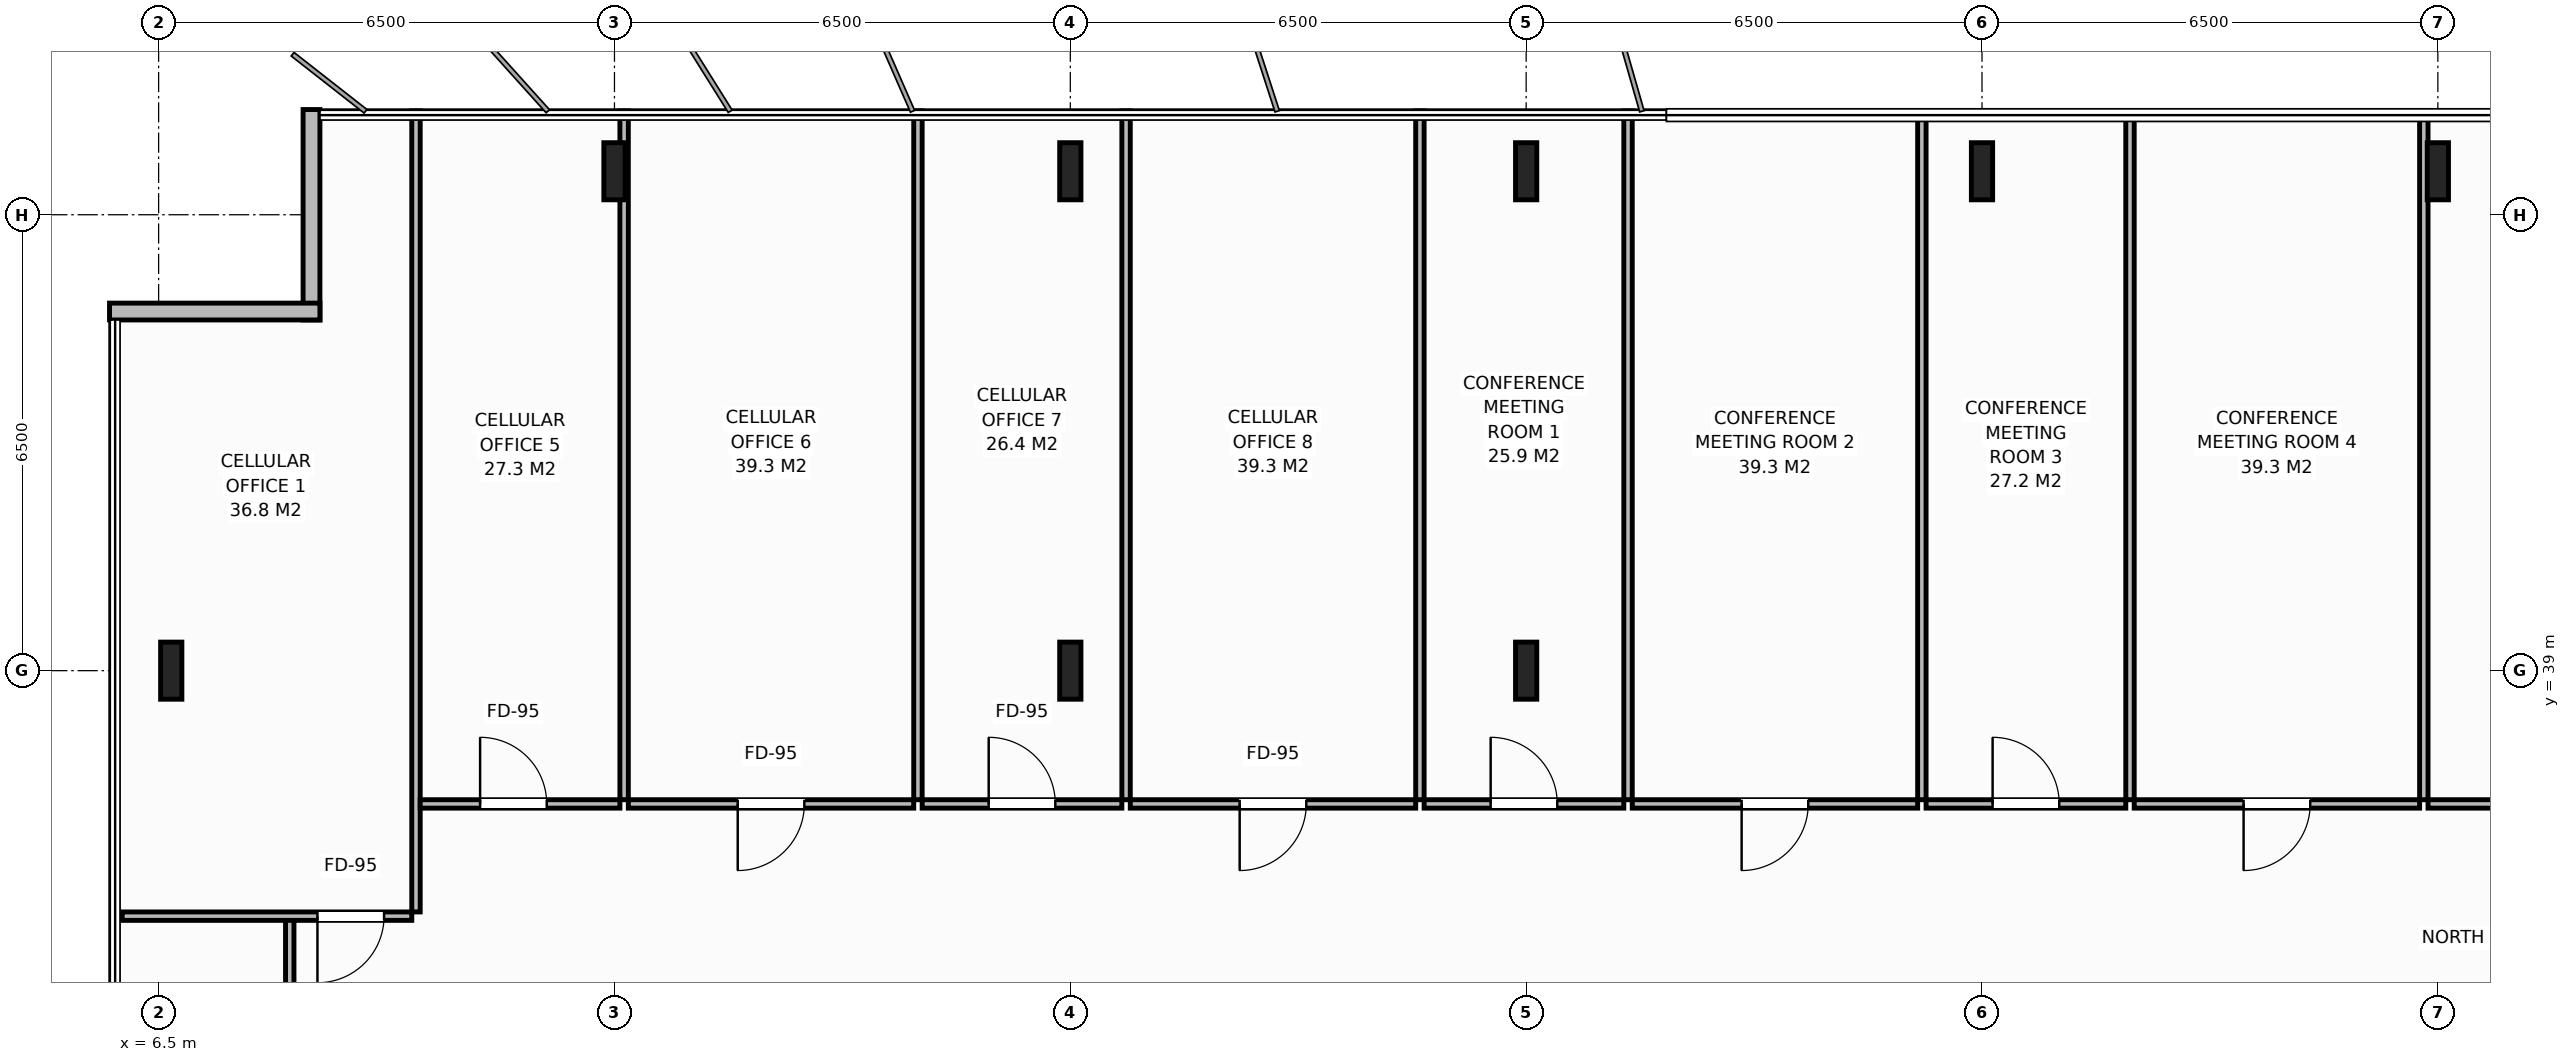
"""IFC4 building model, lengths in metres.
Left out: names, types, materials, properties, quantities, classifications, styles, units other than length and angle.
Written with IfcOpenShell. Run it as: python <this file> out.ifc"""

import sys

from ifc_helpers import new_model, si_unit, direction, frame, frame_2d, origin, origin_2d, place, context, subcontext, project, spatial, rectangle, i_section, extrude, element, fill, save


model = new_model("IFC4")
c1 = context("Model", 3, precision=1e-05, world=origin(), true_north=direction((0.0, 1.0)))
c2 = subcontext(c1, "Body", "Model", "MODEL_VIEW")
j1 = project(units=[si_unit("LENGTHUNIT", "METRE"), si_unit("PLANEANGLEUNIT", "RADIAN")], contexts=[c1])
p1 = place(None, origin())
s1 = spatial("IfcSite", under=j1, at=p1, CompositionType="ELEMENT")
p2 = place(p1, origin())
s2 = spatial("IfcBuilding", under=s1, at=p2, CompositionType="ELEMENT")
p3 = place(p2, frame((0.0, 0.0, 251.8)))
s3 = spatial("IfcBuildingStorey", under=s2, at=p3, CompositionType="ELEMENT", Elevation=251.8)
for number, where, z_axis, x_axis in (
    (1, (19.5, 39.0, 0.0), (0.0, 0.0, 1.0), (1.0, 0.0, 0.0)),
    (2, (26.0, 39.0, 0.0), (0.0, 0.0, 1.0), (1.0, 0.0, 0.0)),
    (3, (13.0, 46.12, 0.0), (0.0, 0.0, 1.0), (1.0, 0.0, 0.0)),
    (4, (19.5, 46.12, 0.0), (0.0, 0.0, 1.0), (1.0, 0.0, 0.0)),
    (5, (26.0, 46.12, 0.0), (0.0, 0.0, 1.0), (1.0, 0.0, 0.0)),
    (6, (32.5, 46.12, 0.0), (0.0, 0.0, 1.0), (1.0, 0.0, 0.0)),
    (7, (39.0, 46.12, 0.0), (0.0, 0.0, 1.0), (1.0, 0.0, 0.0)),
    (8, (6.68, 39.0, 0.0), (0.0, 0.0, 1.0), (1.0, 0.0, 0.0)),
):
    element("IfcColumn", number, at=place(p3, frame(where, z_axis=z_axis, x_axis=x_axis)), inside=s3, PredefinedType="COLUMN", context=c2, shape_type="SweptSolid", body=[
        extrude(i_section(OverallWidth=0.303, OverallDepth=0.814, WebThickness=0.021, FlangeThickness=0.04, at=origin_2d()), origin(), (0.0, 0.0, 1.0), 3.8),
    ])
for number, where, z_axis, x_axis in (
    (9, (8.68, 44.0, 0.0), (0.0, 0.0, 1.0), (0.0, 1.0, 0.0)),
    (10, (5.8, 44.12, 0.0), (0.0, 0.0, 1.0), (1.0, 0.0, 0.0)),
):
    element("IfcWall", number, at=place(p3, frame(where, z_axis=z_axis, x_axis=x_axis)), inside=s3, PredefinedType="STANDARD", context=c2, shape_type="SweptSolid", body=[
        extrude(rectangle(XDim=3.0, YDim=0.24, at=frame_2d((1.5, 0.0))), origin(), (0.0, 0.0, 1.0), 3.588),
    ])
p4 = place(p3, frame((8.37, 33.4, 0.0), z_axis=(0.0, 0.0, 1.0), x_axis=(0.0, 1.0, 0.0)))
e11 = element("IfcWall", 11, at=p4, inside=s3, PredefinedType="PARTITIONING", context=c2, shape_type="SweptSolid", body=[
    extrude(rectangle(XDim=2.1, YDim=0.12, at=frame_2d((1.05, 0.0))), origin(), (0.0, 0.0, 1.0), 3.588),
])
p5 = place(p3, frame((10.17, 35.56, 0.0), z_axis=(0.0, 0.0, 1.0), x_axis=(0.0, 1.0, 0.0)))
e12 = element("IfcWall", 12, at=p5, inside=s3, PredefinedType="PARTITIONING", context=c2, shape_type="SweptSolid", body=[
    extrude(rectangle(XDim=11.42, YDim=0.12, at=frame_2d((5.71, 0.0))), origin(), (0.0, 0.0, 1.0), 3.588),
])
p6 = place(p3, frame((5.98, 35.5, 0.0), z_axis=(0.0, 0.0, 1.0), x_axis=(1.0, 0.0, 0.0)))
e13 = element("IfcWall", 13, at=p6, inside=s3, PredefinedType="PARTITIONING", context=c2, shape_type="SweptSolid", body=[
    extrude(rectangle(XDim=4.13, YDim=0.12, at=frame_2d((2.065, 0.0))), origin(), (0.0, 0.0, 1.0), 3.588),
])
p7 = place(p6, frame((2.785, 0.0, 0.0)))
e14 = element("IfcOpeningElement", 14, at=p7, cuts=e13, PredefinedType="OPENING", context=c2, shape_type="SweptSolid", body=[
    extrude(rectangle(XDim=0.95, YDim=2.15, at=frame_2d((0.475, 1.075))), frame((0.0, 0.07, 0.0), z_axis=(0.0, -1.0, 0.0), x_axis=(1.0, 0.0, 0.0)), (0.0, 0.0, 1.0), 0.14),
])
p8 = place(p3, frame((13.138, 37.16, 0.0), z_axis=(0.0, 0.0, 1.0), x_axis=(0.0, 1.0, 0.0)))
e15 = element("IfcWall", 15, at=p8, inside=s3, PredefinedType="PARTITIONING", context=c2, shape_type="SweptSolid", body=[
    extrude(rectangle(XDim=9.82, YDim=0.12, at=frame_2d((4.91, 0.0))), origin(), (0.0, 0.0, 1.0), 2.388),
])
p9 = place(p3, frame((10.23, 37.1, 0.0), z_axis=(0.0, 0.0, 1.0), x_axis=(1.0, 0.0, 0.0)))
e16 = element("IfcWall", 16, at=p9, inside=s3, PredefinedType="PARTITIONING", context=c2, shape_type="SweptSolid", body=[
    extrude(rectangle(XDim=2.848, YDim=0.12, at=frame_2d((1.424, 0.0))), origin(), (0.0, 0.0, 1.0), 3.588),
])
p10 = place(p9, frame((0.854, 0.0, 0.0)))
e17 = element("IfcOpeningElement", 17, at=p10, cuts=e16, PredefinedType="OPENING", context=c2, shape_type="SweptSolid", body=[
    extrude(rectangle(XDim=0.95, YDim=2.15, at=frame_2d((0.475, 1.075))), frame((0.0, 0.07, 0.0), z_axis=(0.0, -1.0, 0.0), x_axis=(1.0, 0.0, 0.0)), (0.0, 0.0, 1.0), 0.14),
])
p11 = place(p3, frame((17.327, 37.16, 0.0), z_axis=(0.0, 0.0, 1.0), x_axis=(0.0, 1.0, 0.0)))
e18 = element("IfcWall", 18, at=p11, inside=s3, PredefinedType="PARTITIONING", context=c2, shape_type="SweptSolid", body=[
    extrude(rectangle(XDim=9.82, YDim=0.12, at=frame_2d((4.91, 0.0))), origin(), (0.0, 0.0, 1.0), 3.588),
])
p12 = place(p3, frame((13.198, 37.1, 0.0), z_axis=(0.0, 0.0, 1.0), x_axis=(1.0, 0.0, 0.0)))
e19 = element("IfcWall", 19, at=p12, inside=s3, PredefinedType="PARTITIONING", context=c2, shape_type="SweptSolid", body=[
    extrude(rectangle(XDim=4.07, YDim=0.12, at=frame_2d((2.035, 0.0))), origin(), (0.0, 0.0, 1.0), 3.588),
])
p13 = place(p12, frame((1.56, 0.0, 0.0)))
e20 = element("IfcOpeningElement", 20, at=p13, cuts=e19, PredefinedType="OPENING", context=c2, shape_type="SweptSolid", body=[
    extrude(rectangle(XDim=0.95, YDim=2.15, at=frame_2d((0.475, 1.075))), frame((0.0, 0.07, 0.0), z_axis=(0.0, -1.0, 0.0), x_axis=(1.0, 0.0, 0.0)), (0.0, 0.0, 1.0), 0.14),
])
p14 = place(p3, frame((20.295, 37.16, 0.0), z_axis=(0.0, 0.0, 1.0), x_axis=(0.0, 1.0, 0.0)))
e21 = element("IfcWall", 21, at=p14, inside=s3, PredefinedType="PARTITIONING", context=c2, shape_type="SweptSolid", body=[
    extrude(rectangle(XDim=9.82, YDim=0.12, at=frame_2d((4.91, 0.0))), origin(), (0.0, 0.0, 1.0), 3.588),
])
p15 = place(p3, frame((17.387, 37.1, 0.0), z_axis=(0.0, 0.0, 1.0), x_axis=(1.0, 0.0, 0.0)))
e22 = element("IfcWall", 22, at=p15, inside=s3, PredefinedType="PARTITIONING", context=c2, shape_type="SweptSolid", body=[
    extrude(rectangle(XDim=2.848, YDim=0.12, at=frame_2d((1.424, 0.0))), origin(), (0.0, 0.0, 1.0), 3.588),
])
p16 = place(p15, frame((0.949, 0.0, 0.0)))
e23 = element("IfcOpeningElement", 23, at=p16, cuts=e22, PredefinedType="OPENING", context=c2, shape_type="SweptSolid", body=[
    extrude(rectangle(XDim=0.95, YDim=2.15, at=frame_2d((0.475, 1.075))), frame((0.0, 0.07, 0.0), z_axis=(0.0, -1.0, 0.0), x_axis=(1.0, 0.0, 0.0)), (0.0, 0.0, 1.0), 0.14),
])
p17 = place(p3, frame((24.485, 37.16, 0.0), z_axis=(0.0, 0.0, 1.0), x_axis=(0.0, 1.0, 0.0)))
e24 = element("IfcWall", 24, at=p17, inside=s3, PredefinedType="PARTITIONING", context=c2, shape_type="SweptSolid", body=[
    extrude(rectangle(XDim=9.82, YDim=0.12, at=frame_2d((4.91, 0.0))), origin(), (0.0, 0.0, 1.0), 3.588),
])
p18 = place(p3, frame((20.355, 37.1, 0.0), z_axis=(0.0, 0.0, 1.0), x_axis=(1.0, 0.0, 0.0)))
e25 = element("IfcWall", 25, at=p18, inside=s3, PredefinedType="PARTITIONING", context=c2, shape_type="SweptSolid", body=[
    extrude(rectangle(XDim=4.07, YDim=0.12, at=frame_2d((2.035, 0.0))), origin(), (0.0, 0.0, 1.0), 3.588),
])
p19 = place(p18, frame((1.56, 0.0, 0.0)))
e26 = element("IfcOpeningElement", 26, at=p19, cuts=e25, PredefinedType="OPENING", context=c2, shape_type="SweptSolid", body=[
    extrude(rectangle(XDim=0.95, YDim=2.15, at=frame_2d((0.475, 1.075))), frame((0.0, 0.07, 0.0), z_axis=(0.0, -1.0, 0.0), x_axis=(1.0, 0.0, 0.0)), (0.0, 0.0, 1.0), 0.14),
])
p20 = place(p3, frame((27.453, 37.16, 0.0), z_axis=(0.0, 0.0, 1.0), x_axis=(0.0, 1.0, 0.0)))
e27 = element("IfcWall", 27, at=p20, inside=s3, PredefinedType="PARTITIONING", context=c2, shape_type="SweptSolid", body=[
    extrude(rectangle(XDim=9.82, YDim=0.12, at=frame_2d((4.91, 0.0))), origin(), (0.0, 0.0, 1.0), 3.588),
])
p21 = place(p3, frame((24.545, 37.1, 0.0), z_axis=(0.0, 0.0, 1.0), x_axis=(1.0, 0.0, 0.0)))
e28 = element("IfcWall", 28, at=p21, inside=s3, PredefinedType="PARTITIONING", context=c2, shape_type="SweptSolid", body=[
    extrude(rectangle(XDim=2.848, YDim=0.12, at=frame_2d((1.424, 0.0))), origin(), (0.0, 0.0, 1.0), 3.588),
])
p22 = place(p21, frame((0.949, 0.0, 0.0)))
e29 = element("IfcOpeningElement", 29, at=p22, cuts=e28, PredefinedType="OPENING", context=c2, shape_type="SweptSolid", body=[
    extrude(rectangle(XDim=0.95, YDim=2.15, at=frame_2d((0.475, 1.075))), frame((0.0, 0.07, 0.0), z_axis=(0.0, -1.0, 0.0), x_axis=(1.0, 0.0, 0.0)), (0.0, 0.0, 1.0), 0.14),
])
p23 = place(p3, frame((31.642, 37.16, 0.0), z_axis=(0.0, 0.0, 1.0), x_axis=(0.0, 1.0, 0.0)))
e30 = element("IfcWall", 30, at=p23, inside=s3, PredefinedType="PARTITIONING", context=c2, shape_type="SweptSolid", body=[
    extrude(rectangle(XDim=9.82, YDim=0.12, at=frame_2d((4.91, 0.0))), origin(), (0.0, 0.0, 1.0), 3.588),
])
p24 = place(p3, frame((27.513, 37.1, 0.0), z_axis=(0.0, 0.0, 1.0), x_axis=(1.0, 0.0, 0.0)))
e31 = element("IfcWall", 31, at=p24, inside=s3, PredefinedType="PARTITIONING", context=c2, shape_type="SweptSolid", body=[
    extrude(rectangle(XDim=4.07, YDim=0.12, at=frame_2d((2.035, 0.0))), origin(), (0.0, 0.0, 1.0), 3.588),
])
p25 = place(p24, frame((1.56, 0.0, 0.0)))
e32 = element("IfcOpeningElement", 32, at=p25, cuts=e31, PredefinedType="OPENING", context=c2, shape_type="SweptSolid", body=[
    extrude(rectangle(XDim=0.95, YDim=2.15, at=frame_2d((0.475, 1.075))), frame((0.0, 0.07, 0.0), z_axis=(0.0, -1.0, 0.0), x_axis=(1.0, 0.0, 0.0)), (0.0, 0.0, 1.0), 0.14),
])
p26 = place(p3, frame((34.61, 37.16, 0.0), z_axis=(0.0, 0.0, 1.0), x_axis=(0.0, 1.0, 0.0)))
e33 = element("IfcWall", 33, at=p26, inside=s3, PredefinedType="PARTITIONING", context=c2, shape_type="SweptSolid", body=[
    extrude(rectangle(XDim=9.82, YDim=0.12, at=frame_2d((4.91, 0.0))), origin(), (0.0, 0.0, 1.0), 3.588),
])
p27 = place(p3, frame((31.702, 37.1, 0.0), z_axis=(0.0, 0.0, 1.0), x_axis=(1.0, 0.0, 0.0)))
e34 = element("IfcWall", 34, at=p27, inside=s3, PredefinedType="PARTITIONING", context=c2, shape_type="SweptSolid", body=[
    extrude(rectangle(XDim=2.848, YDim=0.12, at=frame_2d((1.424, 0.0))), origin(), (0.0, 0.0, 1.0), 3.588),
])
p28 = place(p27, frame((0.949, 0.0, 0.0)))
e35 = element("IfcOpeningElement", 35, at=p28, cuts=e34, PredefinedType="OPENING", context=c2, shape_type="SweptSolid", body=[
    extrude(rectangle(XDim=0.95, YDim=2.15, at=frame_2d((0.475, 1.075))), frame((0.0, 0.07, 0.0), z_axis=(0.0, -1.0, 0.0), x_axis=(1.0, 0.0, 0.0)), (0.0, 0.0, 1.0), 0.14),
])
p29 = place(p3, frame((38.8, 37.16, 0.0), z_axis=(0.0, 0.0, 1.0), x_axis=(0.0, 1.0, 0.0)))
e36 = element("IfcWall", 36, at=p29, inside=s3, PredefinedType="PARTITIONING", context=c2, shape_type="SweptSolid", body=[
    extrude(rectangle(XDim=9.82, YDim=0.12, at=frame_2d((4.91, 0.0))), origin(), (0.0, 0.0, 1.0), 2.388),
])
p30 = place(p3, frame((34.67, 37.1, 0.0), z_axis=(0.0, 0.0, 1.0), x_axis=(1.0, 0.0, 0.0)))
e37 = element("IfcWall", 37, at=p30, inside=s3, PredefinedType="PARTITIONING", context=c2, shape_type="SweptSolid", body=[
    extrude(rectangle(XDim=4.07, YDim=0.12, at=frame_2d((2.035, 0.0))), origin(), (0.0, 0.0, 1.0), 3.588),
])
p31 = place(p30, frame((1.56, 0.0, 0.0)))
e38 = element("IfcOpeningElement", 38, at=p31, cuts=e37, PredefinedType="OPENING", context=c2, shape_type="SweptSolid", body=[
    extrude(rectangle(XDim=0.95, YDim=2.15, at=frame_2d((0.475, 1.075))), frame((0.0, 0.07, 0.0), z_axis=(0.0, -1.0, 0.0), x_axis=(1.0, 0.0, 0.0)), (0.0, 0.0, 1.0), 0.14),
])
p32 = place(p3, frame((38.86, 37.1, 0.0), z_axis=(0.0, 0.0, 1.0), x_axis=(1.0, 0.0, 0.0)))
e39 = element("IfcWall", 39, at=p32, inside=s3, PredefinedType="PARTITIONING", context=c2, shape_type="SweptSolid", body=[
    extrude(rectangle(XDim=12.72, YDim=0.12, at=frame_2d((6.36, 0.0))), origin(), (0.0, 0.0, 1.0), 3.588),
])
p33 = place(p32, frame((3.816, 0.0, 0.0)))
e40 = element("IfcOpeningElement", 40, at=p33, cuts=e39, PredefinedType="OPENING", context=c2, shape_type="SweptSolid", body=[
    extrude(rectangle(XDim=0.95, YDim=2.15, at=frame_2d((0.475, 1.075))), frame((0.0, 0.07, 0.0), z_axis=(0.0, -1.0, 0.0), x_axis=(1.0, 0.0, 0.0)), (0.0, 0.0, 1.0), 0.14),
])
p34 = place(p7, origin())
e41 = element("IfcDoor", 41, at=p34, inside=s3, OperationType="SINGLE_SWING_RIGHT", PredefinedType="DOOR", context=c2, shape_type="SweptSolid", body=[
    extrude(rectangle(XDim=0.95, YDim=2.15, at=frame_2d((0.475, 1.075))), frame((0.0, 0.025, 0.0), z_axis=(0.0, -1.0, 0.0), x_axis=(1.0, 0.0, 0.0)), (0.0, 0.0, 1.0), 0.05),
])
fill(e14, e41)
p35 = place(p10, origin())
e42 = element("IfcDoor", 42, at=p35, inside=s3, OperationType="SINGLE_SWING_LEFT", PredefinedType="DOOR", context=c2, shape_type="SweptSolid", body=[
    extrude(rectangle(XDim=0.95, YDim=2.15, at=frame_2d((0.475, 1.075))), frame((0.0, 0.025, 0.0), z_axis=(0.0, -1.0, 0.0), x_axis=(1.0, 0.0, 0.0)), (0.0, 0.0, 1.0), 0.05),
])
fill(e17, e42)
p36 = place(p13, origin())
e43 = element("IfcDoor", 43, at=p36, inside=s3, OperationType="SINGLE_SWING_RIGHT", PredefinedType="DOOR", context=c2, shape_type="SweptSolid", body=[
    extrude(rectangle(XDim=0.95, YDim=2.15, at=frame_2d((0.475, 1.075))), frame((0.0, 0.025, 0.0), z_axis=(0.0, -1.0, 0.0), x_axis=(1.0, 0.0, 0.0)), (0.0, 0.0, 1.0), 0.05),
])
fill(e20, e43)
p37 = place(p16, origin())
e44 = element("IfcDoor", 44, at=p37, inside=s3, OperationType="SINGLE_SWING_LEFT", PredefinedType="DOOR", context=c2, shape_type="SweptSolid", body=[
    extrude(rectangle(XDim=0.95, YDim=2.15, at=frame_2d((0.475, 1.075))), frame((0.0, 0.025, 0.0), z_axis=(0.0, -1.0, 0.0), x_axis=(1.0, 0.0, 0.0)), (0.0, 0.0, 1.0), 0.05),
])
fill(e23, e44)
p38 = place(p19, origin())
e45 = element("IfcDoor", 45, at=p38, inside=s3, OperationType="SINGLE_SWING_RIGHT", PredefinedType="DOOR", context=c2, shape_type="SweptSolid", body=[
    extrude(rectangle(XDim=0.95, YDim=2.15, at=frame_2d((0.475, 1.075))), frame((0.0, 0.025, 0.0), z_axis=(0.0, -1.0, 0.0), x_axis=(1.0, 0.0, 0.0)), (0.0, 0.0, 1.0), 0.05),
])
fill(e26, e45)
p39 = place(p22, origin())
e46 = element("IfcDoor", 46, at=p39, inside=s3, OperationType="SINGLE_SWING_LEFT", PredefinedType="DOOR", context=c2, shape_type="SweptSolid", body=[
    extrude(rectangle(XDim=0.95, YDim=2.15, at=frame_2d((0.475, 1.075))), frame((0.0, 0.025, 0.0), z_axis=(0.0, -1.0, 0.0), x_axis=(1.0, 0.0, 0.0)), (0.0, 0.0, 1.0), 0.05),
])
fill(e29, e46)
p40 = place(p25, origin())
e47 = element("IfcDoor", 47, at=p40, inside=s3, OperationType="SINGLE_SWING_RIGHT", PredefinedType="DOOR", context=c2, shape_type="SweptSolid", body=[
    extrude(rectangle(XDim=0.95, YDim=2.15, at=frame_2d((0.475, 1.075))), frame((0.0, 0.025, 0.0), z_axis=(0.0, -1.0, 0.0), x_axis=(1.0, 0.0, 0.0)), (0.0, 0.0, 1.0), 0.05),
])
fill(e32, e47)
p41 = place(p28, origin())
e48 = element("IfcDoor", 48, at=p41, inside=s3, OperationType="SINGLE_SWING_LEFT", PredefinedType="DOOR", context=c2, shape_type="SweptSolid", body=[
    extrude(rectangle(XDim=0.95, YDim=2.15, at=frame_2d((0.475, 1.075))), frame((0.0, 0.025, 0.0), z_axis=(0.0, -1.0, 0.0), x_axis=(1.0, 0.0, 0.0)), (0.0, 0.0, 1.0), 0.05),
])
fill(e35, e48)
p42 = place(p31, origin())
e49 = element("IfcDoor", 49, at=p42, inside=s3, OperationType="SINGLE_SWING_RIGHT", PredefinedType="DOOR", context=c2, shape_type="SweptSolid", body=[
    extrude(rectangle(XDim=0.95, YDim=2.15, at=frame_2d((0.475, 1.075))), frame((0.0, 0.025, 0.0), z_axis=(0.0, -1.0, 0.0), x_axis=(1.0, 0.0, 0.0)), (0.0, 0.0, 1.0), 0.05),
])
fill(e38, e49)
save(model, sys.argv[1])
